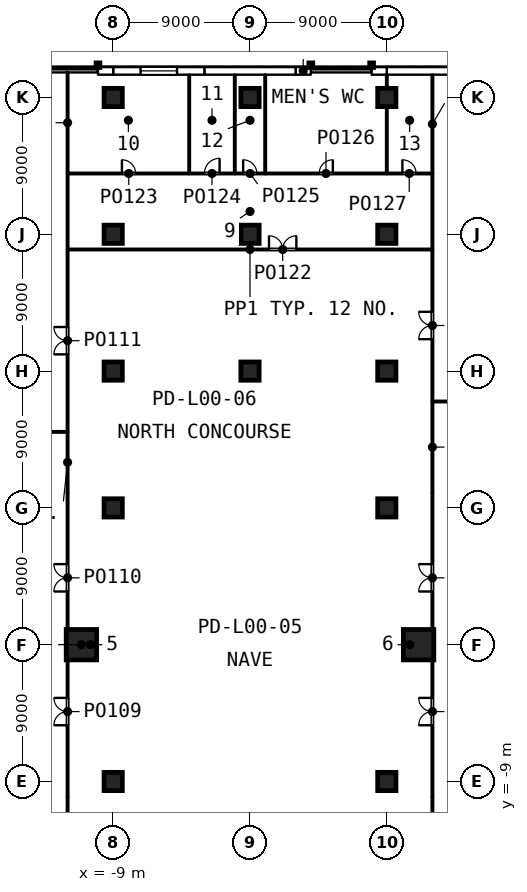
"""IFC4 building model, lengths in metres.
Left out: names, types, materials, properties, quantities, classifications, styles, units other than length and angle.
Written with IfcOpenShell. Run it as: python <this file> out.ifc"""

import sys

from ifc_helpers import new_model, si_unit, direction, frame, frame_2d, origin, origin_2d, place, context, subcontext, project, spatial, rectangle, extrude, element, fill, save


model = new_model("IFC4")
c1 = context("Model", 3, precision=1e-05, world=origin(), true_north=direction((0.0, 1.0)))
c2 = subcontext(c1, "Body", "Model", "MODEL_VIEW")
j1 = project(units=[si_unit("LENGTHUNIT", "METRE"), si_unit("PLANEANGLEUNIT", "RADIAN")], contexts=[c1])
p1 = place(None, origin())
s1 = spatial("IfcSite", under=j1, at=p1, CompositionType="ELEMENT")
p2 = place(p1, origin())
s2 = spatial("IfcBuilding", under=s1, at=p2, CompositionType="ELEMENT")
p3 = place(p2, origin())
s3 = spatial("IfcBuildingStorey", under=s2, at=p3, CompositionType="ELEMENT", Elevation=0.0)
for number, where, z_axis, x_axis in (
    (1, (-9.0, -9.0, 0.0), (0.0, 0.0, 1.0), (1.0, 0.0, 0.0)),
    (2, (-9.0, 9.0, 0.0), (0.0, 0.0, 1.0), (1.0, 0.0, 0.0)),
    (3, (-9.0, 18.0, 0.0), (0.0, 0.0, 1.0), (1.0, 0.0, 0.0)),
    (4, (-9.0, 27.0, 0.0), (0.0, 0.0, 1.0), (1.0, 0.0, 0.0)),
    (5, (-9.0, 36.0, 0.0), (0.0, 0.0, 1.0), (1.0, 0.0, 0.0)),
    (6, (0.0, 18.0, 0.0), (0.0, 0.0, 1.0), (1.0, 0.0, 0.0)),
    (7, (0.0, 27.0, 0.0), (0.0, 0.0, 1.0), (1.0, 0.0, 0.0)),
    (8, (0.0, 36.0, 0.0), (0.0, 0.0, 1.0), (1.0, 0.0, 0.0)),
    (9, (9.0, -9.0, 0.0), (0.0, 0.0, 1.0), (1.0, 0.0, 0.0)),
    (10, (9.0, 9.0, 0.0), (0.0, 0.0, 1.0), (1.0, 0.0, 0.0)),
    (11, (9.0, 18.0, 0.0), (0.0, 0.0, 1.0), (1.0, 0.0, 0.0)),
    (12, (9.0, 27.0, 0.0), (0.0, 0.0, 1.0), (1.0, 0.0, 0.0)),
    (13, (9.0, 36.0, 0.0), (0.0, 0.0, 1.0), (1.0, 0.0, 0.0)),
):
    element("IfcColumn", number, at=place(p3, frame(where, z_axis=z_axis, x_axis=x_axis)), inside=s3, PredefinedType="COLUMN", context=c2, shape_type="SweptSolid", body=[
        extrude(rectangle(XDim=1.2, YDim=1.2, at=origin_2d()), origin(), (0.0, 0.0, 1.0), 7.2),
    ])
for number, where, z_axis, x_axis in (
    (14, (-11.09, 0.0, 0.0), (0.0, 0.0, 1.0), (1.0, 0.0, 0.0)),
    (15, (11.09, 0.0, 0.0), (0.0, 0.0, 1.0), (-1.0, 0.0, 0.0)),
):
    element("IfcColumn", number, at=place(p3, frame(where, z_axis=z_axis, x_axis=x_axis)), inside=s3, PredefinedType="COLUMN", context=c2, shape_type="SweptSolid", body=[
        extrude(rectangle(XDim=2.0, YDim=2.0, at=origin_2d()), origin(), (0.0, 0.0, 1.0), 7.2),
    ])
p4 = place(p3, frame((15.0, 37.75, 0.0), z_axis=(0.0, 0.0, 1.0), x_axis=(-1.0, 0.0, 0.0)))
e16 = element("IfcWall", 16, at=p4, inside=s3, PredefinedType="SOLIDWALL", context=c2, shape_type="SweptSolid", body=[
    extrude(rectangle(XDim=6.0, YDim=0.5, at=frame_2d((3.0, 0.0))), origin(), (0.0, 0.0, 1.0), 6.9),
])
for number, where, z_axis, x_axis in (
    (17, (9.0, 37.75, 0.0), (0.0, 0.0, 1.0), (-1.0, 0.0, 0.0)),
    (18, (4.0, 37.75, 0.0), (0.0, 0.0, 1.0), (-1.0, 0.0, 0.0)),
):
    element("IfcWall", number, at=place(p3, frame(where, z_axis=z_axis, x_axis=x_axis)), inside=s3, PredefinedType="SOLIDWALL", context=c2, shape_type="SweptSolid", body=[
        extrude(rectangle(XDim=1.0, YDim=0.5, at=frame_2d((0.5, 0.0))), origin(), (0.0, 0.0, 1.0), 6.9),
    ])
p5 = place(p3, frame((3.0, 37.75, 0.0), z_axis=(0.0, 0.0, 1.0), x_axis=(-1.0, 0.0, 0.0)))
e19 = element("IfcWall", 19, at=p5, inside=s3, PredefinedType="SOLIDWALL", context=c2, shape_type="SweptSolid", body=[
    extrude(rectangle(XDim=6.0, YDim=0.5, at=frame_2d((3.0, 0.0))), origin(), (0.0, 0.0, 1.0), 6.9),
])
p6 = place(p3, frame((-3.0, 37.75, 0.0), z_axis=(0.0, 0.0, 1.0), x_axis=(-1.0, 0.0, 0.0)))
e20 = element("IfcWall", 20, at=p6, inside=s3, PredefinedType="SOLIDWALL", context=c2, shape_type="SweptSolid", body=[
    extrude(rectangle(XDim=6.0, YDim=0.5, at=frame_2d((3.0, 0.0))), origin(), (0.0, 0.0, 1.0), 6.9),
])
p7 = place(p6, frame((1.8, 0.0, 0.9)))
e21 = element("IfcOpeningElement", 21, at=p7, cuts=e20, PredefinedType="OPENING", context=c2, shape_type="SweptSolid", body=[
    extrude(rectangle(XDim=2.4, YDim=3.6, at=frame_2d((1.2, 1.8))), frame((0.0, 0.26, 0.0), z_axis=(0.0, -1.0, 0.0), x_axis=(1.0, 0.0, 0.0)), (0.0, 0.0, 1.0), 0.52),
])
p8 = place(p3, frame((-9.0, 37.75, 0.0), z_axis=(0.0, 0.0, 1.0), x_axis=(-1.0, 0.0, 0.0)))
e22 = element("IfcWall", 22, at=p8, inside=s3, PredefinedType="SOLIDWALL", context=c2, shape_type="SweptSolid", body=[
    extrude(rectangle(XDim=1.0, YDim=0.5, at=frame_2d((0.5, 0.0))), origin(), (0.0, 0.0, 1.0), 6.9),
])
p9 = place(p3, frame((-12.0, 10.0, 0.0), z_axis=(0.0, 0.0, 1.0), x_axis=(0.0, 1.0, 0.0)))
e23 = element("IfcWall", 23, at=p9, inside=s3, PredefinedType="PARTITIONING", context=c2, shape_type="SweptSolid", body=[
    extrude(rectangle(XDim=4.0, YDim=0.1, at=frame_2d((2.0, 0.0))), origin(), (0.0, 0.0, 1.0), 6.9),
])
p10 = place(p3, frame((-12.0, 14.0, 0.0), z_axis=(0.0, 0.0, 1.0), x_axis=(0.0, 1.0, 0.0)))
e24 = element("IfcWall", 24, at=p10, inside=s3, PredefinedType="PARTITIONING", context=c2, shape_type="SweptSolid", body=[
    extrude(rectangle(XDim=12.0, YDim=0.1, at=frame_2d((6.0, 0.0))), origin(), (0.0, 0.0, 1.0), 6.9),
])
p11 = place(p10, frame((5.1, 0.0, 0.0)))
e25 = element("IfcOpeningElement", 25, at=p11, cuts=e24, PredefinedType="OPENING", context=c2, shape_type="SweptSolid", body=[
    extrude(rectangle(XDim=1.8, YDim=2.1, at=frame_2d((0.9, 1.05))), frame((0.0, 0.06, 0.0), z_axis=(0.0, -1.0, 0.0), x_axis=(1.0, 0.0, 0.0)), (0.0, 0.0, 1.0), 0.12),
])
p12 = place(p3, frame((12.0, 10.0, 0.0), z_axis=(0.0, 0.0, 1.0), x_axis=(0.0, 1.0, 0.0)))
e26 = element("IfcWall", 26, at=p12, inside=s3, PredefinedType="PARTITIONING", context=c2, shape_type="SweptSolid", body=[
    extrude(rectangle(XDim=6.0, YDim=0.1, at=frame_2d((3.0, 0.0))), origin(), (0.0, 0.0, 1.0), 6.9),
])
p13 = place(p3, frame((12.0, 16.0, 0.0), z_axis=(0.0, 0.0, 1.0), x_axis=(0.0, 1.0, 0.0)))
e27 = element("IfcWall", 27, at=p13, inside=s3, PredefinedType="PARTITIONING", context=c2, shape_type="SweptSolid", body=[
    extrude(rectangle(XDim=10.0, YDim=0.1, at=frame_2d((5.0, 0.0))), origin(), (0.0, 0.0, 1.0), 6.9),
])
p14 = place(p13, frame((4.1, 0.0, 0.0)))
e28 = element("IfcOpeningElement", 28, at=p14, cuts=e27, PredefinedType="OPENING", context=c2, shape_type="SweptSolid", body=[
    extrude(rectangle(XDim=1.8, YDim=2.1, at=frame_2d((0.9, 1.05))), frame((0.0, 0.06, 0.0), z_axis=(0.0, -1.0, 0.0), x_axis=(1.0, 0.0, 0.0)), (0.0, 0.0, 1.0), 0.12),
])
p15 = place(p3, frame((-11.95, 26.0, 0.0), z_axis=(0.0, 0.0, 1.0), x_axis=(1.0, 0.0, 0.0)))
e29 = element("IfcWall", 29, at=p15, inside=s3, PredefinedType="PARTITIONING", context=c2, shape_type="SweptSolid", body=[
    extrude(rectangle(XDim=23.9, YDim=0.1, at=frame_2d((11.95, 0.0))), origin(), (0.0, 0.0, 1.0), 6.9),
])
p16 = place(p15, frame((13.2, 0.0, 0.0)))
e30 = element("IfcOpeningElement", 30, at=p16, cuts=e29, PredefinedType="OPENING", context=c2, shape_type="SweptSolid", body=[
    extrude(rectangle(XDim=1.8, YDim=2.1, at=frame_2d((0.9, 1.05))), frame((0.0, 0.06, 0.0), z_axis=(0.0, -1.0, 0.0), x_axis=(1.0, 0.0, 0.0)), (0.0, 0.0, 1.0), 0.12),
])
p17 = place(p3, frame((-12.0, -14.0, 0.0), z_axis=(0.0, 0.0, 1.0), x_axis=(0.0, 1.0, 0.0)))
e31 = element("IfcWall", 31, at=p17, inside=s3, PredefinedType="PARTITIONING", context=c2, shape_type="SweptSolid", body=[
    extrude(rectangle(XDim=4.0, YDim=0.1, at=frame_2d((2.0, 0.0))), origin(), (0.0, 0.0, 1.0), 6.9),
])
p18 = place(p3, frame((12.0, -16.0, 0.0), z_axis=(0.0, 0.0, 1.0), x_axis=(0.0, 1.0, 0.0)))
e32 = element("IfcWall", 32, at=p18, inside=s3, PredefinedType="PARTITIONING", context=c2, shape_type="SweptSolid", body=[
    extrude(rectangle(XDim=6.0, YDim=0.1, at=frame_2d((3.0, 0.0))), origin(), (0.0, 0.0, 1.0), 6.9),
])
p19 = place(p3, frame((-12.0, -10.0, 0.0), z_axis=(0.0, 0.0, 1.0), x_axis=(0.0, 1.0, 0.0)))
e33 = element("IfcWall", 33, at=p19, inside=s3, PredefinedType="PARTITIONING", context=c2, shape_type="SweptSolid", body=[
    extrude(rectangle(XDim=20.0, YDim=0.1, at=frame_2d((10.0, 0.0))), origin(), (0.0, 0.0, 1.0), 6.9),
])
p20 = place(p19, frame((4.7, 0.0, 0.0)))
e34 = element("IfcOpeningElement", 34, at=p20, cuts=e33, PredefinedType="OPENING", context=c2, shape_type="SweptSolid", body=[
    extrude(rectangle(XDim=1.8, YDim=2.1, at=frame_2d((0.9, 1.05))), frame((0.0, 0.06, 0.0), z_axis=(0.0, -1.0, 0.0), x_axis=(1.0, 0.0, 0.0)), (0.0, 0.0, 1.0), 0.12),
])
p21 = place(p19, frame((13.5, 0.0, 0.0)))
e35 = element("IfcOpeningElement", 35, at=p21, cuts=e33, PredefinedType="OPENING", context=c2, shape_type="SweptSolid", body=[
    extrude(rectangle(XDim=1.8, YDim=2.1, at=frame_2d((0.9, 1.05))), frame((0.0, 0.06, 0.0), z_axis=(0.0, -1.0, 0.0), x_axis=(1.0, 0.0, 0.0)), (0.0, 0.0, 1.0), 0.12),
])
p22 = place(p3, frame((12.0, -10.0, 0.0), z_axis=(0.0, 0.0, 1.0), x_axis=(0.0, 1.0, 0.0)))
e36 = element("IfcWall", 36, at=p22, inside=s3, PredefinedType="PARTITIONING", context=c2, shape_type="SweptSolid", body=[
    extrude(rectangle(XDim=20.0, YDim=0.1, at=frame_2d((10.0, 0.0))), origin(), (0.0, 0.0, 1.0), 6.9),
])
p23 = place(p22, frame((4.7, 0.0, 0.0)))
e37 = element("IfcOpeningElement", 37, at=p23, cuts=e36, PredefinedType="OPENING", context=c2, shape_type="SweptSolid", body=[
    extrude(rectangle(XDim=1.8, YDim=2.1, at=frame_2d((0.9, 1.05))), frame((0.0, 0.06, 0.0), z_axis=(0.0, -1.0, 0.0), x_axis=(1.0, 0.0, 0.0)), (0.0, 0.0, 1.0), 0.12),
])
p24 = place(p22, frame((13.5, 0.0, 0.0)))
e38 = element("IfcOpeningElement", 38, at=p24, cuts=e36, PredefinedType="OPENING", context=c2, shape_type="SweptSolid", body=[
    extrude(rectangle(XDim=1.8, YDim=2.1, at=frame_2d((0.9, 1.05))), frame((0.0, 0.06, 0.0), z_axis=(0.0, -1.0, 0.0), x_axis=(1.0, 0.0, 0.0)), (0.0, 0.0, 1.0), 0.12),
])
p25 = place(p3, frame((-56.35, 14.0, 0.0), z_axis=(0.0, 0.0, 1.0), x_axis=(1.0, 0.0, 0.0)))
e39 = element("IfcWall", 39, at=p25, inside=s3, PredefinedType="PARTITIONING", context=c2, shape_type="SweptSolid", body=[
    extrude(rectangle(XDim=44.3, YDim=0.1, at=frame_2d((22.15, 0.0))), origin(), (0.0, 0.0, 1.0), 6.9),
])
p26 = place(p25, frame((33.82, 0.0, 0.0)))
e40 = element("IfcOpeningElement", 40, at=p26, cuts=e39, PredefinedType="OPENING", context=c2, shape_type="SweptSolid", body=[
    extrude(rectangle(XDim=1.8, YDim=2.1, at=frame_2d((0.9, 1.05))), frame((0.0, 0.06, 0.0), z_axis=(0.0, -1.0, 0.0), x_axis=(1.0, 0.0, 0.0)), (0.0, 0.0, 1.0), 0.12),
])
p27 = place(p3, frame((-12.0, 26.0, 0.0), z_axis=(0.0, 0.0, 1.0), x_axis=(0.0, 1.0, 0.0)))
e41 = element("IfcWall", 41, at=p27, inside=s3, PredefinedType="PARTITIONING", context=c2, shape_type="SweptSolid", body=[
    extrude(rectangle(XDim=5.0, YDim=0.1, at=frame_2d((2.5, 0.0))), origin(), (0.0, 0.0, 1.0), 6.9),
])
p28 = place(p3, frame((-12.0, 31.0, 0.0), z_axis=(0.0, 0.0, 1.0), x_axis=(0.0, 1.0, 0.0)))
e42 = element("IfcWall", 42, at=p28, inside=s3, PredefinedType="PARTITIONING", context=c2, shape_type="SweptSolid", body=[
    extrude(rectangle(XDim=6.68, YDim=0.1, at=frame_2d((3.34, 0.0))), origin(), (0.0, 0.0, 1.0), 6.9),
])
p29 = place(p3, frame((12.05, 16.0, 0.0), z_axis=(0.0, 0.0, 1.0), x_axis=(1.0, 0.0, 0.0)))
e43 = element("IfcWall", 43, at=p29, inside=s3, PredefinedType="PARTITIONING", context=c2, shape_type="SweptSolid", body=[
    extrude(rectangle(XDim=62.45, YDim=0.1, at=frame_2d((31.225, 0.0))), origin(), (0.0, 0.0, 1.0), 6.9),
])
p30 = place(p29, frame((48.34, 0.0, 0.0)))
e44 = element("IfcOpeningElement", 44, at=p30, cuts=e43, PredefinedType="OPENING", context=c2, shape_type="SweptSolid", body=[
    extrude(rectangle(XDim=1.8, YDim=2.1, at=frame_2d((0.9, 1.05))), frame((0.0, 0.06, 0.0), z_axis=(0.0, -1.0, 0.0), x_axis=(1.0, 0.0, 0.0)), (0.0, 0.0, 1.0), 0.12),
])
p31 = place(p3, frame((12.0, 26.0, 0.0), z_axis=(0.0, 0.0, 1.0), x_axis=(0.0, 1.0, 0.0)))
e45 = element("IfcWall", 45, at=p31, inside=s3, PredefinedType="PARTITIONING", context=c2, shape_type="SweptSolid", body=[
    extrude(rectangle(XDim=5.0, YDim=0.1, at=frame_2d((2.5, 0.0))), origin(), (0.0, 0.0, 1.0), 6.9),
])
p32 = place(p3, frame((12.0, 31.0, 0.0), z_axis=(0.0, 0.0, 1.0), x_axis=(0.0, 1.0, 0.0)))
e46 = element("IfcWall", 46, at=p32, inside=s3, PredefinedType="PARTITIONING", context=c2, shape_type="SweptSolid", body=[
    extrude(rectangle(XDim=6.5, YDim=0.1, at=frame_2d((3.25, 0.0))), origin(), (0.0, 0.0, 1.0), 6.9),
])
p33 = place(p3, frame((-11.95, 31.0, 0.0), z_axis=(0.0, 0.0, 1.0), x_axis=(1.0, 0.0, 0.0)))
e47 = element("IfcWall", 47, at=p33, inside=s3, PredefinedType="PARTITIONING", context=c2, shape_type="SweptSolid", body=[
    extrude(rectangle(XDim=7.95, YDim=0.1, at=frame_2d((3.975, 0.0))), origin(), (0.0, 0.0, 1.0), 6.9),
])
p34 = place(p33, frame((3.525, 0.0, 0.0)))
e48 = element("IfcOpeningElement", 48, at=p34, cuts=e47, PredefinedType="OPENING", context=c2, shape_type="SweptSolid", body=[
    extrude(rectangle(XDim=0.9, YDim=2.1, at=frame_2d((0.45, 1.05))), frame((0.0, 0.06, 0.0), z_axis=(0.0, -1.0, 0.0), x_axis=(1.0, 0.0, 0.0)), (0.0, 0.0, 1.0), 0.12),
])
p35 = place(p3, frame((-4.0, 31.0, 0.0), z_axis=(0.0, 0.0, 1.0), x_axis=(1.0, 0.0, 0.0)))
e49 = element("IfcWall", 49, at=p35, inside=s3, PredefinedType="PARTITIONING", context=c2, shape_type="SweptSolid", body=[
    extrude(rectangle(XDim=3.0, YDim=0.1, at=frame_2d((1.5, 0.0))), origin(), (0.0, 0.0, 1.0), 6.9),
])
p36 = place(p35, frame((1.0, 0.0, 0.0)))
e50 = element("IfcOpeningElement", 50, at=p36, cuts=e49, PredefinedType="OPENING", context=c2, shape_type="SweptSolid", body=[
    extrude(rectangle(XDim=1.0, YDim=2.1, at=frame_2d((0.5, 1.05))), frame((0.0, 0.06, 0.0), z_axis=(0.0, -1.0, 0.0), x_axis=(1.0, 0.0, 0.0)), (0.0, 0.0, 1.0), 0.12),
])
p37 = place(p3, frame((-1.0, 31.0, 0.0), z_axis=(0.0, 0.0, 1.0), x_axis=(1.0, 0.0, 0.0)))
e51 = element("IfcWall", 51, at=p37, inside=s3, PredefinedType="PARTITIONING", context=c2, shape_type="SweptSolid", body=[
    extrude(rectangle(XDim=2.0, YDim=0.1, at=frame_2d((1.0, 0.0))), origin(), (0.0, 0.0, 1.0), 6.9),
])
p38 = place(p37, frame((0.55, 0.0, 0.0)))
e52 = element("IfcOpeningElement", 52, at=p38, cuts=e51, PredefinedType="OPENING", context=c2, shape_type="SweptSolid", body=[
    extrude(rectangle(XDim=0.9, YDim=2.1, at=frame_2d((0.45, 1.05))), frame((0.0, 0.06, 0.0), z_axis=(0.0, -1.0, 0.0), x_axis=(1.0, 0.0, 0.0)), (0.0, 0.0, 1.0), 0.12),
])
p39 = place(p3, frame((1.0, 31.0, 0.0), z_axis=(0.0, 0.0, 1.0), x_axis=(1.0, 0.0, 0.0)))
e53 = element("IfcWall", 53, at=p39, inside=s3, PredefinedType="PARTITIONING", context=c2, shape_type="SweptSolid", body=[
    extrude(rectangle(XDim=8.0, YDim=0.1, at=frame_2d((4.0, 0.0))), origin(), (0.0, 0.0, 1.0), 6.9),
])
p40 = place(p39, frame((3.55, 0.0, 0.0)))
e54 = element("IfcOpeningElement", 54, at=p40, cuts=e53, PredefinedType="OPENING", context=c2, shape_type="SweptSolid", body=[
    extrude(rectangle(XDim=0.9, YDim=2.1, at=frame_2d((0.45, 1.05))), frame((0.0, 0.06, 0.0), z_axis=(0.0, -1.0, 0.0), x_axis=(1.0, 0.0, 0.0)), (0.0, 0.0, 1.0), 0.12),
])
p41 = place(p3, frame((9.0, 31.0, 0.0), z_axis=(0.0, 0.0, 1.0), x_axis=(1.0, 0.0, 0.0)))
e55 = element("IfcWall", 55, at=p41, inside=s3, PredefinedType="PARTITIONING", context=c2, shape_type="SweptSolid", body=[
    extrude(rectangle(XDim=2.95, YDim=0.1, at=frame_2d((1.475, 0.0))), origin(), (0.0, 0.0, 1.0), 6.9),
])
p42 = place(p41, frame((1.025, 0.0, 0.0)))
e56 = element("IfcOpeningElement", 56, at=p42, cuts=e55, PredefinedType="OPENING", context=c2, shape_type="SweptSolid", body=[
    extrude(rectangle(XDim=0.9, YDim=2.1, at=frame_2d((0.45, 1.05))), frame((0.0, 0.06, 0.0), z_axis=(0.0, -1.0, 0.0), x_axis=(1.0, 0.0, 0.0)), (0.0, 0.0, 1.0), 0.12),
])
for number, where, z_axis, x_axis in (
    (57, (-4.0, 31.05, 0.0), (0.0, 0.0, 1.0), (0.0, 1.0, 0.0)),
    (58, (-1.0, 31.05, 0.0), (0.0, 0.0, 1.0), (0.0, 1.0, 0.0)),
    (59, (1.0, 31.05, 0.0), (0.0, 0.0, 1.0), (0.0, 1.0, 0.0)),
):
    element("IfcWall", number, at=place(p3, frame(where, z_axis=z_axis, x_axis=x_axis)), inside=s3, PredefinedType="PARTITIONING", context=c2, shape_type="SweptSolid", body=[
        extrude(rectangle(XDim=6.45, YDim=0.1, at=frame_2d((3.225, 0.0))), origin(), (0.0, 0.0, 1.0), 6.9),
    ])
p43 = place(p3, frame((9.0, 31.05, 0.0), z_axis=(0.0, 0.0, 1.0), x_axis=(0.0, 1.0, 0.0)))
e60 = element("IfcWall", 60, at=p43, inside=s3, PredefinedType="PARTITIONING", context=c2, shape_type="SweptSolid", body=[
    extrude(rectangle(XDim=6.45, YDim=0.1, at=frame_2d((3.225, 0.0))), origin(), (0.0, 0.0, 1.0), 5.91),
])
p44 = place(p7, origin())
e61 = element("IfcWindow", 61, at=p44, inside=s3, PartitioningType="SINGLE_PANEL", PredefinedType="WINDOW", context=c2, shape_type="SweptSolid", body=[
    extrude(rectangle(XDim=2.4, YDim=3.6, at=frame_2d((1.2, 1.8))), frame((0.0, 0.03, 0.0), z_axis=(0.0, -1.0, 0.0), x_axis=(1.0, 0.0, 0.0)), (0.0, 0.0, 1.0), 0.06),
])
fill(e21, e61)
p45 = place(p20, origin())
e62 = element("IfcDoor", 62, at=p45, inside=s3, OperationType="DOUBLE_DOOR_DOUBLE_SWING", PredefinedType="DOOR", context=c2, shape_type="SweptSolid", body=[
    extrude(rectangle(XDim=1.8, YDim=2.1, at=frame_2d((0.9, 1.05))), frame((0.0, 0.025, 0.0), z_axis=(0.0, -1.0, 0.0), x_axis=(1.0, 0.0, 0.0)), (0.0, 0.0, 1.0), 0.05),
])
fill(e34, e62)
p46 = place(p21, origin())
e63 = element("IfcDoor", 63, at=p46, inside=s3, OperationType="DOUBLE_DOOR_DOUBLE_SWING", PredefinedType="DOOR", context=c2, shape_type="SweptSolid", body=[
    extrude(rectangle(XDim=1.8, YDim=2.1, at=frame_2d((0.9, 1.05))), frame((0.0, 0.025, 0.0), z_axis=(0.0, -1.0, 0.0), x_axis=(1.0, 0.0, 0.0)), (0.0, 0.0, 1.0), 0.05),
])
fill(e35, e63)
p47 = place(p11, origin())
e64 = element("IfcDoor", 64, at=p47, inside=s3, OperationType="DOUBLE_DOOR_DOUBLE_SWING", PredefinedType="DOOR", context=c2, shape_type="SweptSolid", body=[
    extrude(rectangle(XDim=1.8, YDim=2.1, at=frame_2d((0.9, 1.05))), frame((0.0, 0.025, 0.0), z_axis=(0.0, -1.0, 0.0), x_axis=(1.0, 0.0, 0.0)), (0.0, 0.0, 1.0), 0.05),
])
fill(e25, e64)
p48 = place(p23, origin())
e65 = element("IfcDoor", 65, at=p48, inside=s3, OperationType="DOUBLE_DOOR_DOUBLE_SWING", PredefinedType="DOOR", context=c2, shape_type="SweptSolid", body=[
    extrude(rectangle(XDim=1.8, YDim=2.1, at=frame_2d((0.9, 1.05))), frame((0.0, 0.025, 0.0), z_axis=(0.0, -1.0, 0.0), x_axis=(1.0, 0.0, 0.0)), (0.0, 0.0, 1.0), 0.05),
])
fill(e37, e65)
p49 = place(p24, origin())
e66 = element("IfcDoor", 66, at=p49, inside=s3, OperationType="DOUBLE_DOOR_DOUBLE_SWING", PredefinedType="DOOR", context=c2, shape_type="SweptSolid", body=[
    extrude(rectangle(XDim=1.8, YDim=2.1, at=frame_2d((0.9, 1.05))), frame((0.0, 0.025, 0.0), z_axis=(0.0, -1.0, 0.0), x_axis=(1.0, 0.0, 0.0)), (0.0, 0.0, 1.0), 0.05),
])
fill(e38, e66)
p50 = place(p14, origin())
e67 = element("IfcDoor", 67, at=p50, inside=s3, OperationType="DOUBLE_DOOR_DOUBLE_SWING", PredefinedType="DOOR", context=c2, shape_type="SweptSolid", body=[
    extrude(rectangle(XDim=1.8, YDim=2.1, at=frame_2d((0.9, 1.05))), frame((0.0, 0.025, 0.0), z_axis=(0.0, -1.0, 0.0), x_axis=(1.0, 0.0, 0.0)), (0.0, 0.0, 1.0), 0.05),
])
fill(e28, e67)
p51 = place(p16, origin())
e68 = element("IfcDoor", 68, at=p51, inside=s3, OperationType="DOUBLE_DOOR_DOUBLE_SWING", PredefinedType="DOOR", context=c2, shape_type="SweptSolid", body=[
    extrude(rectangle(XDim=1.8, YDim=2.1, at=frame_2d((0.9, 1.05))), frame((0.0, 0.025, 0.0), z_axis=(0.0, -1.0, 0.0), x_axis=(1.0, 0.0, 0.0)), (0.0, 0.0, 1.0), 0.05),
])
fill(e30, e68)
p52 = place(p34, origin())
e69 = element("IfcDoor", 69, at=p52, inside=s3, OperationType="SINGLE_SWING_LEFT", PredefinedType="DOOR", context=c2, shape_type="SweptSolid", body=[
    extrude(rectangle(XDim=0.9, YDim=2.1, at=frame_2d((0.45, 1.05))), frame((0.0, 0.025, 0.0), z_axis=(0.0, -1.0, 0.0), x_axis=(1.0, 0.0, 0.0)), (0.0, 0.0, 1.0), 0.05),
])
fill(e48, e69)
p53 = place(p36, origin())
e70 = element("IfcDoor", 70, at=p53, inside=s3, OperationType="SINGLE_SWING_RIGHT", PredefinedType="DOOR", context=c2, shape_type="SweptSolid", body=[
    extrude(rectangle(XDim=1.0, YDim=2.1, at=frame_2d((0.5, 1.05))), frame((0.0, 0.025, 0.0), z_axis=(0.0, -1.0, 0.0), x_axis=(1.0, 0.0, 0.0)), (0.0, 0.0, 1.0), 0.05),
])
fill(e50, e70)
p54 = place(p38, origin())
e71 = element("IfcDoor", 71, at=p54, inside=s3, OperationType="SINGLE_SWING_LEFT", PredefinedType="DOOR", context=c2, shape_type="SweptSolid", body=[
    extrude(rectangle(XDim=0.9, YDim=2.1, at=frame_2d((0.45, 1.05))), frame((0.0, 0.025, 0.0), z_axis=(0.0, -1.0, 0.0), x_axis=(1.0, 0.0, 0.0)), (0.0, 0.0, 1.0), 0.05),
])
fill(e52, e71)
p55 = place(p40, origin())
e72 = element("IfcDoor", 72, at=p55, inside=s3, OperationType="SINGLE_SWING_RIGHT", PredefinedType="DOOR", context=c2, shape_type="SweptSolid", body=[
    extrude(rectangle(XDim=0.9, YDim=2.1, at=frame_2d((0.45, 1.05))), frame((0.0, 0.025, 0.0), z_axis=(0.0, -1.0, 0.0), x_axis=(1.0, 0.0, 0.0)), (0.0, 0.0, 1.0), 0.05),
])
fill(e54, e72)
p56 = place(p42, origin())
e73 = element("IfcDoor", 73, at=p56, inside=s3, OperationType="SINGLE_SWING_LEFT", PredefinedType="DOOR", context=c2, shape_type="SweptSolid", body=[
    extrude(rectangle(XDim=0.9, YDim=2.1, at=frame_2d((0.45, 1.05))), frame((0.0, 0.025, 0.0), z_axis=(0.0, -1.0, 0.0), x_axis=(1.0, 0.0, 0.0)), (0.0, 0.0, 1.0), 0.05),
])
fill(e56, e73)
save(model, sys.argv[1])
